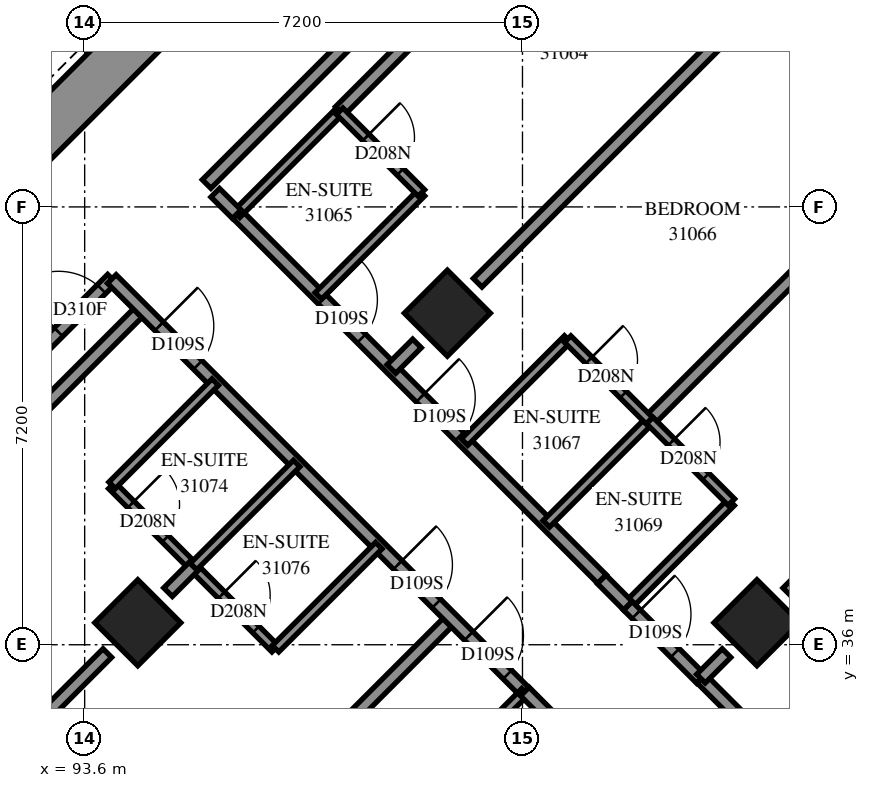
"""IFC4 building model, lengths in metres.
Left out: names, types, materials, properties, quantities, classifications, styles, units other than length and angle.
Written with IfcOpenShell. Run it as: python <this file> out.ifc"""

import sys

from ifc_helpers import new_model, si_unit, direction, frame, frame_2d, origin, origin_2d, place, context, subcontext, project, spatial, rectangle, extrude, element, fill, save


model = new_model("IFC4")
c1 = context("Model", 3, precision=1e-05, world=origin(), true_north=direction((0.0, 1.0)))
c2 = subcontext(c1, "Body", "Model", "MODEL_VIEW")
j1 = project(units=[si_unit("LENGTHUNIT", "METRE"), si_unit("PLANEANGLEUNIT", "RADIAN")], contexts=[c1])
p1 = place(None, origin())
s1 = spatial("IfcSite", under=j1, at=p1, CompositionType="ELEMENT")
p2 = place(p1, origin())
s2 = spatial("IfcBuilding", under=s1, at=p2, CompositionType="ELEMENT")
p3 = place(p2, frame((0.0, 0.0, 115.2)))
s3 = spatial("IfcBuildingStorey", under=s2, at=p3, CompositionType="ELEMENT", Elevation=115.2)
for number, where, z_axis, x_axis in (
    (1, (99.565, 41.453, 0.0), (0.0, 0.0, 1.0), (0.707, -0.707, 0.0)),
    (2, (94.474, 36.362, 0.0), (0.0, 0.0, 1.0), (0.707, -0.707, 0.0)),
    (3, (104.656, 36.362, 0.0), (0.0, 0.0, 1.0), (0.707, -0.707, 0.0)),
):
    element("IfcColumn", number, at=place(p3, frame(where, z_axis=z_axis, x_axis=x_axis)), inside=s3, PredefinedType="COLUMN", context=c2, shape_type="SweptSolid", body=[
        extrude(rectangle(XDim=1.0, YDim=1.0, at=origin_2d()), origin(), (0.0, 0.0, 1.0), 3.1),
    ])
p4 = place(p3, frame((87.12, 38.625, -0.3), z_axis=(0.0, 0.0, 1.0), x_axis=(0.7071067812, 0.7071067812, 0.0)))
e4 = element("IfcWall", 4, at=p4, inside=s3, PredefinedType="SHEAR", context=c2, shape_type="SweptSolid", body=[
    extrude(rectangle(XDim=14.4, YDim=0.8, at=frame_2d((7.2, 0.0))), origin(), (0.0, 0.0, 1.0), 2.7),
])
p5 = place(p4, frame((4.55, 0.0, 0.3)))
e5 = element("IfcOpeningElement", 5, at=p5, cuts=e4, PredefinedType="OPENING", context=c2, shape_type="SweptSolid", body=[
    extrude(rectangle(XDim=1.1, YDim=2.1, at=frame_2d((0.55, 1.05))), frame((0.0, 0.41, 0.0), z_axis=(0.0, -1.0, 0.0), x_axis=(1.0, 0.0, 0.0)), (0.0, 0.0, 1.0), 0.82),
])
p6 = place(p4, frame((11.35, 0.0, 0.3)))
e6 = element("IfcOpeningElement", 6, at=p6, cuts=e4, PredefinedType="OPENING", context=c2, shape_type="SweptSolid", body=[
    extrude(rectangle(XDim=1.1, YDim=2.1, at=frame_2d((0.55, 1.05))), frame((0.0, 0.41, 0.0), z_axis=(0.0, -1.0, 0.0), x_axis=(1.0, 0.0, 0.0)), (0.0, 0.0, 1.0), 0.82),
])
p7 = place(p3, frame((86.33, 33.311, 0.0), z_axis=(0.0, 0.0, 1.0), x_axis=(0.7071067812, 0.7071067812, 0.0)))
e7 = element("IfcWall", 7, at=p7, inside=s3, PredefinedType="PARTITIONING", context=c2, shape_type="SweptSolid", body=[
    extrude(rectangle(XDim=11.616, YDim=0.2, at=frame_2d((5.808, 0.0))), origin(), (0.0, 0.0, 1.0), 3.1),
])
p8 = place(p3, frame((91.451, 28.249, 0.0), z_axis=(0.0, 0.0, 1.0), x_axis=(0.7071067812, 0.7071067812, 0.0)))
e8 = element("IfcWall", 8, at=p8, inside=s3, PredefinedType="PARTITIONING", context=c2, shape_type="SweptSolid", body=[
    extrude(rectangle(XDim=11.574, YDim=0.2, at=frame_2d((5.787, 0.0))), origin(), (0.0, 0.0, 1.0), 3.1),
])
p9 = place(p3, frame((86.835, 34.806, 0.0), z_axis=(0.0, 0.0, 1.0), x_axis=(0.7071067812, 0.7071067812, 0.0)))
e9 = element("IfcWall", 9, at=p9, inside=s3, PredefinedType="PARTITIONING", context=c2, shape_type="SweptSolid", body=[
    extrude(rectangle(XDim=10.201, YDim=0.2, at=frame_2d((5.1, 0.0))), origin(), (0.0, 0.0, 1.0), 3.1),
])
p10 = place(p9, frame((8.959, 0.0, 0.0)))
e10 = element("IfcOpeningElement", 10, at=p10, cuts=e9, PredefinedType="OPENING", context=c2, shape_type="SweptSolid", body=[
    extrude(rectangle(XDim=1.0, YDim=2.1, at=frame_2d((0.5, 1.05))), frame((0.0, 0.11, 0.0), z_axis=(0.0, -1.0, 0.0), x_axis=(1.0, 0.0, 0.0)), (0.0, 0.0, 1.0), 0.22),
])
p11 = place(p3, frame((94.047, 42.015, 0.0), z_axis=(0.0, 0.0, 1.0), x_axis=(0.7071067812, -0.7071067812, 0.0)))
e11 = element("IfcWall", 11, at=p11, inside=s3, PredefinedType="PARTITIONING", context=c2, shape_type="SweptSolid", body=[
    extrude(rectangle(XDim=9.6, YDim=0.2, at=frame_2d((4.8, 0.0))), origin(), (0.0, 0.0, 1.0), 3.1),
])
p12 = place(p11, frame((1.099, 0.0, 0.0)))
e12 = element("IfcOpeningElement", 12, at=p12, cuts=e11, PredefinedType="OPENING", context=c2, shape_type="SweptSolid", body=[
    extrude(rectangle(XDim=0.9, YDim=2.1, at=frame_2d((0.45, 1.05))), frame((0.0, 0.11, 0.0), z_axis=(0.0, -1.0, 0.0), x_axis=(1.0, 0.0, 0.0)), (0.0, 0.0, 1.0), 0.22),
])
p13 = place(p11, frame((6.649, 0.0, 0.0)))
e13 = element("IfcOpeningElement", 13, at=p13, cuts=e11, PredefinedType="OPENING", context=c2, shape_type="SweptSolid", body=[
    extrude(rectangle(XDim=0.9, YDim=2.1, at=frame_2d((0.45, 1.05))), frame((0.0, 0.11, 0.0), z_axis=(0.0, -1.0, 0.0), x_axis=(1.0, 0.0, 0.0)), (0.0, 0.0, 1.0), 0.22),
])
p14 = place(p11, frame((8.3, 0.0, 0.0)))
e14 = element("IfcOpeningElement", 14, at=p14, cuts=e11, PredefinedType="OPENING", context=c2, shape_type="SweptSolid", body=[
    extrude(rectangle(XDim=0.9, YDim=2.1, at=frame_2d((0.45, 1.05))), frame((0.0, 0.11, 0.0), z_axis=(0.0, -1.0, 0.0), x_axis=(1.0, 0.0, 0.0)), (0.0, 0.0, 1.0), 0.22),
])
p15 = place(p3, frame((96.103, 43.083, 0.0), z_axis=(0.0, 0.0, 1.0), x_axis=(0.7071067812, -0.7071067812, 0.0)))
e15 = element("IfcWall", 15, at=p15, inside=s3, PredefinedType="PARTITIONING", context=c2, shape_type="SweptSolid", body=[
    extrude(rectangle(XDim=8.491, YDim=0.2, at=frame_2d((4.245, 0.0))), origin(), (0.0, 0.0, 1.0), 3.1),
])
p16 = place(p15, frame((1.995, 0.0, 0.0)))
e16 = element("IfcOpeningElement", 16, at=p16, cuts=e15, PredefinedType="OPENING", context=c2, shape_type="SweptSolid", body=[
    extrude(rectangle(XDim=0.9, YDim=2.1, at=frame_2d((0.45, 1.05))), frame((0.0, 0.11, 0.0), z_axis=(0.0, -1.0, 0.0), x_axis=(1.0, 0.0, 0.0)), (0.0, 0.0, 1.0), 0.22),
])
p17 = place(p15, frame((4.27, 0.0, 0.0)))
e17 = element("IfcOpeningElement", 17, at=p17, cuts=e15, PredefinedType="OPENING", context=c2, shape_type="SweptSolid", body=[
    extrude(rectangle(XDim=0.9, YDim=2.1, at=frame_2d((0.45, 1.05))), frame((0.0, 0.11, 0.0), z_axis=(0.0, -1.0, 0.0), x_axis=(1.0, 0.0, 0.0)), (0.0, 0.0, 1.0), 0.22),
])
p18 = place(p3, frame((95.606, 43.577, 0.0), z_axis=(0.0, 0.0, 1.0), x_axis=(0.7071067812, 0.7071067812, 0.0)))
e18 = element("IfcWall", 18, at=p18, inside=s3, PredefinedType="PARTITIONING", context=c2, shape_type="SweptSolid", body=[
    extrude(rectangle(XDim=7.798, YDim=0.2, at=frame_2d((3.899, 0.0))), origin(), (0.0, 0.0, 1.0), 3.1),
])
p19 = place(p3, frame((102.888, 39.686, 0.0), z_axis=(0.0, 0.0, 1.0), x_axis=(0.7071067812, 0.7071067812, 0.0)))
e19 = element("IfcWall", 19, at=p19, inside=s3, PredefinedType="PARTITIONING", context=c2, shape_type="SweptSolid", body=[
    extrude(rectangle(XDim=7.278, YDim=0.2, at=frame_2d((3.639, 0.0))), origin(), (0.0, 0.0, 1.0), 3.1),
])
p20 = place(p3, frame((108.831, 30.355, 0.0), z_axis=(0.0, 0.0, 1.0), x_axis=(-0.7073012053, 0.7069123036, 0.0)))
e20 = element("IfcWall", 20, at=p20, inside=s3, PredefinedType="PARTITIONING", context=c2, shape_type="SweptSolid", body=[
    extrude(rectangle(XDim=7.2, YDim=0.2, at=frame_2d((3.6, 0.0))), origin(), (0.0, 0.0, 1.0), 2.6),
])
p21 = place(p20, frame((4.125, 0.0, 0.0)))
e21 = element("IfcOpeningElement", 21, at=p21, cuts=e20, PredefinedType="OPENING", context=c2, shape_type="SweptSolid", body=[
    extrude(rectangle(XDim=1.0, YDim=2.1, at=frame_2d((0.5, 1.05))), frame((0.0, 0.11, 0.0), z_axis=(0.0, -1.0, 0.0), x_axis=(1.0, 0.0, 0.0)), (0.0, 0.0, 1.0), 0.22),
])
p22 = place(p20, frame((0.705, 0.0, 0.0)))
e22 = element("IfcOpeningElement", 22, at=p22, cuts=e20, PredefinedType="OPENING", context=c2, shape_type="SweptSolid", body=[
    extrude(rectangle(XDim=0.9, YDim=2.1, at=frame_2d((0.45, 1.05))), frame((0.0, 0.11, 0.0), z_axis=(0.0, -1.0, 0.0), x_axis=(1.0, 0.0, 0.0)), (0.0, 0.0, 1.0), 0.22),
])
p23 = place(p3, frame((97.795, 44.777, 0.0), z_axis=(0.0, 0.0, 1.0), x_axis=(0.707252317, 0.7069612154, 0.0)))
e23 = element("IfcWall", 23, at=p23, inside=s3, PredefinedType="PARTITIONING", context=c2, shape_type="SweptSolid", body=[
    extrude(rectangle(XDim=7.214, YDim=0.2, at=frame_2d((3.607, 0.0))), origin(), (0.0, 0.0, 1.0), 3.1),
])
for number, where, z_axis, x_axis in (
    (24, (89.881, 31.771, 0.0), (0.0, 0.0, 1.0), (0.707, 0.707, 0.0)),
    (25, (105.155, 36.863, 0.0), (0.0, 0.0, 1.0), (0.707, 0.707, 0.0)),
    (26, (100.063, 41.953, 0.0), (0.0, 0.0, 1.0), (0.707, 0.707, 0.0)),
):
    element("IfcWall", number, at=place(p3, frame(where, z_axis=z_axis, x_axis=x_axis)), inside=s3, PredefinedType="PARTITIONING", context=c2, shape_type="SweptSolid", body=[
        extrude(rectangle(XDim=5.787, YDim=0.2, at=frame_2d((2.893, 0.0))), origin(), (0.0, 0.0, 1.0), 3.1),
    ])
p24 = place(p3, frame((94.047, 38.621, 0.0), z_axis=(0.0, 0.0, 1.0), x_axis=(0.7071067812, -0.7071067812, 0.0)))
e27 = element("IfcWall", 27, at=p24, inside=s3, PredefinedType="PARTITIONING", context=c2, shape_type="SweptSolid", body=[
    extrude(rectangle(XDim=3.799, YDim=0.15, at=frame_2d((1.899, 0.0))), origin(), (0.0, 0.0, 1.0), 3.1),
])
p25 = place(p24, frame((0.444, 0.0, 0.0)))
e28 = element("IfcOpeningElement", 28, at=p25, cuts=e27, PredefinedType="OPENING", context=c2, shape_type="SweptSolid", body=[
    extrude(rectangle(XDim=0.8, YDim=2.1, at=frame_2d((0.4, 1.05))), frame((0.0, 0.085, 0.0), z_axis=(0.0, -1.0, 0.0), x_axis=(1.0, 0.0, 0.0)), (0.0, 0.0, 1.0), 0.17),
])
p26 = place(p24, frame((2.551, 0.0, 0.0)))
e29 = element("IfcOpeningElement", 29, at=p26, cuts=e27, PredefinedType="OPENING", context=c2, shape_type="SweptSolid", body=[
    extrude(rectangle(XDim=0.8, YDim=2.1, at=frame_2d((0.4, 1.05))), frame((0.0, 0.085, 0.0), z_axis=(0.0, -1.0, 0.0), x_axis=(1.0, 0.0, 0.0)), (0.0, 0.0, 1.0), 0.17),
])
p27 = place(p3, frame((102.533, 36.645, 0.0), z_axis=(0.0, 0.0, 1.0), x_axis=(0.7071067812, 0.7071067812, 0.0)))
e30 = element("IfcWall", 30, at=p27, inside=s3, PredefinedType="PARTITIONING", context=c2, shape_type="SweptSolid", body=[
    extrude(rectangle(XDim=2.401, YDim=0.15, at=frame_2d((1.201, 0.0))), origin(), (0.0, 0.0, 1.0), 3.1),
])
for number, where, z_axis, x_axis in (
    (31, (101.192, 37.988, 0.0), (0.0, 0.0, 1.0), (0.707, 0.708, 0.0)),
    (32, (95.389, 37.285, 0.0), (0.0, 0.0, 1.0), (0.708, 0.707, 0.0)),
    (33, (94.052, 38.622, 0.0), (0.0, 0.0, 1.0), (0.707, 0.708, 0.0)),
    (34, (96.739, 35.935, 0.0), (0.0, 0.0, 1.0), (0.708, 0.707, 0.0)),
    (35, (99.143, 33.531, 0.0), (0.0, 0.0, 1.0), (0.708, 0.707, 0.0)),
):
    element("IfcWall", number, at=place(p3, frame(where, z_axis=z_axis, x_axis=x_axis)), inside=s3, PredefinedType="PARTITIONING", context=c2, shape_type="SweptSolid", body=[
        extrude(rectangle(XDim=2.4, YDim=0.15, at=frame_2d((1.2, 0.0))), origin(), (0.0, 0.0, 1.0), 3.1),
    ])
for number, where, z_axis, x_axis in (
    (36, (97.443, 41.737, 0.0), (0.0, 0.0, 1.0), (0.707, 0.707, 0.0)),
    (37, (96.099, 43.081, 0.0), (0.0, 0.0, 1.0), (0.707, 0.707, 0.0)),
    (38, (99.847, 39.333, 0.0), (0.0, 0.0, 1.0), (0.707, 0.707, 0.0)),
):
    element("IfcWall", number, at=place(p3, frame(where, z_axis=z_axis, x_axis=x_axis)), inside=s3, PredefinedType="PARTITIONING", context=c2, shape_type="SweptSolid", body=[
        extrude(rectangle(XDim=2.398, YDim=0.15, at=frame_2d((1.199, 0.0))), origin(), (0.0, 0.0, 1.0), 3.1),
    ])
p28 = place(p3, frame((97.793, 44.773, 0.0), z_axis=(0.0, 0.0, 1.0), x_axis=(0.7071067812, -0.7071067812, 0.0)))
e39 = element("IfcWall", 39, at=p28, inside=s3, PredefinedType="PARTITIONING", context=c2, shape_type="SweptSolid", body=[
    extrude(rectangle(XDim=1.901, YDim=0.15, at=frame_2d((0.95, 0.0))), origin(), (0.0, 0.0, 1.0), 3.1),
])
p29 = place(p28, frame((0.609, 0.0, 0.0)))
e40 = element("IfcOpeningElement", 40, at=p29, cuts=e39, PredefinedType="OPENING", context=c2, shape_type="SweptSolid", body=[
    extrude(rectangle(XDim=0.8, YDim=2.1, at=frame_2d((0.4, 1.05))), frame((0.0, 0.085, 0.0), z_axis=(0.0, -1.0, 0.0), x_axis=(1.0, 0.0, 0.0)), (0.0, 0.0, 1.0), 0.17),
])
p30 = place(p3, frame((102.891, 39.69, 0.0), z_axis=(0.0, 0.0, 1.0), x_axis=(0.7071067812, -0.7071067812, 0.0)))
e41 = element("IfcWall", 41, at=p30, inside=s3, PredefinedType="PARTITIONING", context=c2, shape_type="SweptSolid", body=[
    extrude(rectangle(XDim=1.901, YDim=0.15, at=frame_2d((0.95, 0.0))), origin(), (0.0, 0.0, 1.0), 3.1),
])
p31 = place(p30, frame((0.505, 0.0, 0.0)))
e42 = element("IfcOpeningElement", 42, at=p31, cuts=e41, PredefinedType="OPENING", context=c2, shape_type="SweptSolid", body=[
    extrude(rectangle(XDim=0.8, YDim=2.1, at=frame_2d((0.4, 1.05))), frame((0.0, 0.085, 0.0), z_axis=(0.0, -1.0, 0.0), x_axis=(1.0, 0.0, 0.0)), (0.0, 0.0, 1.0), 0.17),
])
p32 = place(p3, frame((100.839, 35.231, 0.0), z_axis=(0.0, 0.0, 1.0), x_axis=(0.7065800724, -0.7076330979, 0.0)))
e43 = element("IfcWall", 43, at=p32, inside=s3, PredefinedType="PARTITIONING", context=c2, shape_type="SweptSolid", body=[
    extrude(rectangle(XDim=1.899, YDim=0.2, at=frame_2d((0.95, 0.0))), origin(), (0.0, 0.0, 1.0), 3.1),
])
p33 = place(p3, frame((101.543, 41.027, 0.0), z_axis=(0.0, 0.0, 1.0), x_axis=(0.7076330979, -0.7065800724, 0.0)))
e44 = element("IfcWall", 44, at=p33, inside=s3, PredefinedType="PARTITIONING", context=c2, shape_type="SweptSolid", body=[
    extrude(rectangle(XDim=1.899, YDim=0.15, at=frame_2d((0.95, 0.0))), origin(), (0.0, 0.0, 1.0), 3.1),
])
p34 = place(p33, frame((0.493, 0.0, 0.0)))
e45 = element("IfcOpeningElement", 45, at=p34, cuts=e44, PredefinedType="OPENING", context=c2, shape_type="SweptSolid", body=[
    extrude(rectangle(XDim=0.8, YDim=2.1, at=frame_2d((0.4, 1.05))), frame((0.0, 0.085, 0.0), z_axis=(0.0, -1.0, 0.0), x_axis=(1.0, 0.0, 0.0)), (0.0, 0.0, 1.0), 0.17),
])
p35 = place(p3, frame((102.531, 36.641, 0.0), z_axis=(0.0, 0.0, 1.0), x_axis=(0.7071067812, -0.7071067812, 0.0)))
e46 = element("IfcWall", 46, at=p35, inside=s3, PredefinedType="PARTITIONING", context=c2, shape_type="SweptSolid", body=[
    extrude(rectangle(XDim=1.7, YDim=0.2, at=frame_2d((0.85, 0.0))), origin(), (0.0, 0.0, 1.0), 3.1),
])
p36 = place(p35, frame((0.198, 0.0, 0.0)))
e47 = element("IfcOpeningElement", 47, at=p36, cuts=e46, PredefinedType="OPENING", context=c2, shape_type="SweptSolid", body=[
    extrude(rectangle(XDim=0.9, YDim=2.1, at=frame_2d((0.45, 1.05))), frame((0.0, 0.11, 0.0), z_axis=(0.0, -1.0, 0.0), x_axis=(1.0, 0.0, 0.0)), (0.0, 0.0, 1.0), 0.22),
])
p37 = place(p3, frame((102.103, 37.075, 0.0), z_axis=(0.0, 0.0, 1.0), x_axis=(0.7054642634, -0.7087454925, 0.0)))
e48 = element("IfcWall", 48, at=p37, inside=s3, PredefinedType="PARTITIONING", context=c2, shape_type="SweptSolid", body=[
    extrude(rectangle(XDim=0.61, YDim=0.2, at=frame_2d((0.305, 0.0))), origin(), (0.0, 0.0, 1.0), 3.1),
])
for number, where, z_axis, x_axis in (
    (49, (98.645, 40.535, 0.0), (0.0, 0.0, 1.0), (0.707, 0.707, 0.0)),
    (50, (103.735, 35.443, 0.0), (0.0, 0.0, 1.0), (0.707, 0.707, 0.0)),
):
    element("IfcWall", number, at=place(p3, frame(where, z_axis=z_axis, x_axis=x_axis)), inside=s3, PredefinedType="PARTITIONING", context=c2, shape_type="SweptSolid", body=[
        extrude(rectangle(XDim=0.594, YDim=0.2, at=frame_2d((0.297, 0.0))), origin(), (0.0, 0.0, 1.0), 3.1),
    ])
p38 = place(p3, frame((94.971, 36.865, 0.0), z_axis=(0.0, 0.0, 1.0), x_axis=(0.7054171665, 0.7087923682, 0.0)))
e51 = element("IfcWall", 51, at=p38, inside=s3, PredefinedType="PARTITIONING", context=c2, shape_type="SweptSolid", body=[
    extrude(rectangle(XDim=0.593, YDim=0.2, at=frame_2d((0.296, 0.0))), origin(), (0.0, 0.0, 1.0), 3.1),
])
p39 = place(p3, frame((95.747, 43.433, 0.0), z_axis=(0.0, 0.0, 1.0), x_axis=(0.7091070712, -0.7051008166, 0.0)))
e52 = element("IfcWall", 52, at=p39, inside=s3, PredefinedType="PARTITIONING", context=c2, shape_type="SweptSolid", body=[
    extrude(rectangle(XDim=0.499, YDim=0.2, at=frame_2d((0.25, 0.0))), origin(), (0.0, 0.0, 1.0), 3.1),
])
p40 = place(p16, origin())
e53 = element("IfcDoor", 53, at=p40, inside=s3, OperationType="SINGLE_SWING_RIGHT", PredefinedType="DOOR", context=c2, shape_type="SweptSolid", body=[
    extrude(rectangle(XDim=0.9, YDim=2.1, at=frame_2d((0.45, 1.05))), frame((0.0, 0.025, 0.0), z_axis=(0.0, -1.0, 0.0), x_axis=(1.0, 0.0, 0.0)), (0.0, 0.0, 1.0), 0.05),
])
fill(e16, e53)
p41 = place(p29, origin())
e54 = element("IfcDoor", 54, at=p41, inside=s3, OperationType="SINGLE_SWING_RIGHT", PredefinedType="DOOR", context=c2, shape_type="SweptSolid", body=[
    extrude(rectangle(XDim=0.8, YDim=2.1, at=frame_2d((0.4, 1.05))), frame((0.0, 0.025, 0.0), z_axis=(0.0, -1.0, 0.0), x_axis=(1.0, 0.0, 0.0)), (0.0, 0.0, 1.0), 0.05),
])
fill(e40, e54)
p42 = place(p17, origin())
e55 = element("IfcDoor", 55, at=p42, inside=s3, OperationType="SINGLE_SWING_LEFT", PredefinedType="DOOR", context=c2, shape_type="SweptSolid", body=[
    extrude(rectangle(XDim=0.9, YDim=2.1, at=frame_2d((0.45, 1.05))), frame((0.0, 0.025, 0.0), z_axis=(0.0, -1.0, 0.0), x_axis=(1.0, 0.0, 0.0)), (0.0, 0.0, 1.0), 0.05),
])
fill(e17, e55)
p43 = place(p34, origin())
e56 = element("IfcDoor", 56, at=p43, inside=s3, OperationType="SINGLE_SWING_RIGHT", PredefinedType="DOOR", context=c2, shape_type="SweptSolid", body=[
    extrude(rectangle(XDim=0.8, YDim=2.1, at=frame_2d((0.4, 1.05))), frame((0.0, 0.025, 0.0), z_axis=(0.0, -1.0, 0.0), x_axis=(1.0, 0.0, 0.0)), (0.0, 0.0, 1.0), 0.05),
])
fill(e45, e56)
p44 = place(p36, origin())
e57 = element("IfcDoor", 57, at=p44, inside=s3, OperationType="SINGLE_SWING_RIGHT", PredefinedType="DOOR", context=c2, shape_type="SweptSolid", body=[
    extrude(rectangle(XDim=0.9, YDim=2.1, at=frame_2d((0.45, 1.05))), frame((0.0, 0.025, 0.0), z_axis=(0.0, -1.0, 0.0), x_axis=(1.0, 0.0, 0.0)), (0.0, 0.0, 1.0), 0.05),
])
fill(e47, e57)
p45 = place(p31, origin())
e58 = element("IfcDoor", 58, at=p45, inside=s3, OperationType="SINGLE_SWING_RIGHT", PredefinedType="DOOR", context=c2, shape_type="SweptSolid", body=[
    extrude(rectangle(XDim=0.8, YDim=2.1, at=frame_2d((0.4, 1.05))), frame((0.0, 0.025, 0.0), z_axis=(0.0, -1.0, 0.0), x_axis=(1.0, 0.0, 0.0)), (0.0, 0.0, 1.0), 0.05),
])
fill(e42, e58)
p46 = place(p10, origin())
e59 = element("IfcDoor", 59, at=p46, inside=s3, OperationType="SINGLE_SWING_LEFT", PredefinedType="DOOR", context=c2, shape_type="SweptSolid", body=[
    extrude(rectangle(XDim=1.0, YDim=2.1, at=frame_2d((0.5, 1.05))), frame((0.0, 0.025, 0.0), z_axis=(0.0, -1.0, 0.0), x_axis=(1.0, 0.0, 0.0)), (0.0, 0.0, 1.0), 0.05),
])
fill(e10, e59)
p47 = place(p12, origin())
e60 = element("IfcDoor", 60, at=p47, inside=s3, OperationType="SINGLE_SWING_LEFT", PredefinedType="DOOR", context=c2, shape_type="SweptSolid", body=[
    extrude(rectangle(XDim=0.9, YDim=2.1, at=frame_2d((0.45, 1.05))), frame((0.0, 0.025, 0.0), z_axis=(0.0, -1.0, 0.0), x_axis=(1.0, 0.0, 0.0)), (0.0, 0.0, 1.0), 0.05),
])
fill(e12, e60)
p48 = place(p25, origin())
e61 = element("IfcDoor", 61, at=p48, inside=s3, OperationType="SINGLE_SWING_RIGHT", PredefinedType="DOOR", context=c2, shape_type="SweptSolid", body=[
    extrude(rectangle(XDim=0.8, YDim=2.1, at=frame_2d((0.4, 1.05))), frame((0.0, 0.025, 0.0), z_axis=(0.0, -1.0, 0.0), x_axis=(1.0, 0.0, 0.0)), (0.0, 0.0, 1.0), 0.05),
])
fill(e28, e61)
p49 = place(p13, origin())
e62 = element("IfcDoor", 62, at=p49, inside=s3, OperationType="SINGLE_SWING_RIGHT", PredefinedType="DOOR", context=c2, shape_type="SweptSolid", body=[
    extrude(rectangle(XDim=0.9, YDim=2.1, at=frame_2d((0.45, 1.05))), frame((0.0, 0.025, 0.0), z_axis=(0.0, -1.0, 0.0), x_axis=(1.0, 0.0, 0.0)), (0.0, 0.0, 1.0), 0.05),
])
fill(e13, e62)
p50 = place(p26, origin())
e63 = element("IfcDoor", 63, at=p50, inside=s3, OperationType="SINGLE_SWING_RIGHT", PredefinedType="DOOR", context=c2, shape_type="SweptSolid", body=[
    extrude(rectangle(XDim=0.8, YDim=2.1, at=frame_2d((0.4, 1.05))), frame((0.0, 0.025, 0.0), z_axis=(0.0, -1.0, 0.0), x_axis=(1.0, 0.0, 0.0)), (0.0, 0.0, 1.0), 0.05),
])
fill(e29, e63)
p51 = place(p14, origin())
e64 = element("IfcDoor", 64, at=p51, inside=s3, OperationType="SINGLE_SWING_LEFT", PredefinedType="DOOR", context=c2, shape_type="SweptSolid", body=[
    extrude(rectangle(XDim=0.9, YDim=2.1, at=frame_2d((0.45, 1.05))), frame((0.0, 0.025, 0.0), z_axis=(0.0, -1.0, 0.0), x_axis=(1.0, 0.0, 0.0)), (0.0, 0.0, 1.0), 0.05),
])
fill(e14, e64)
save(model, sys.argv[1])
